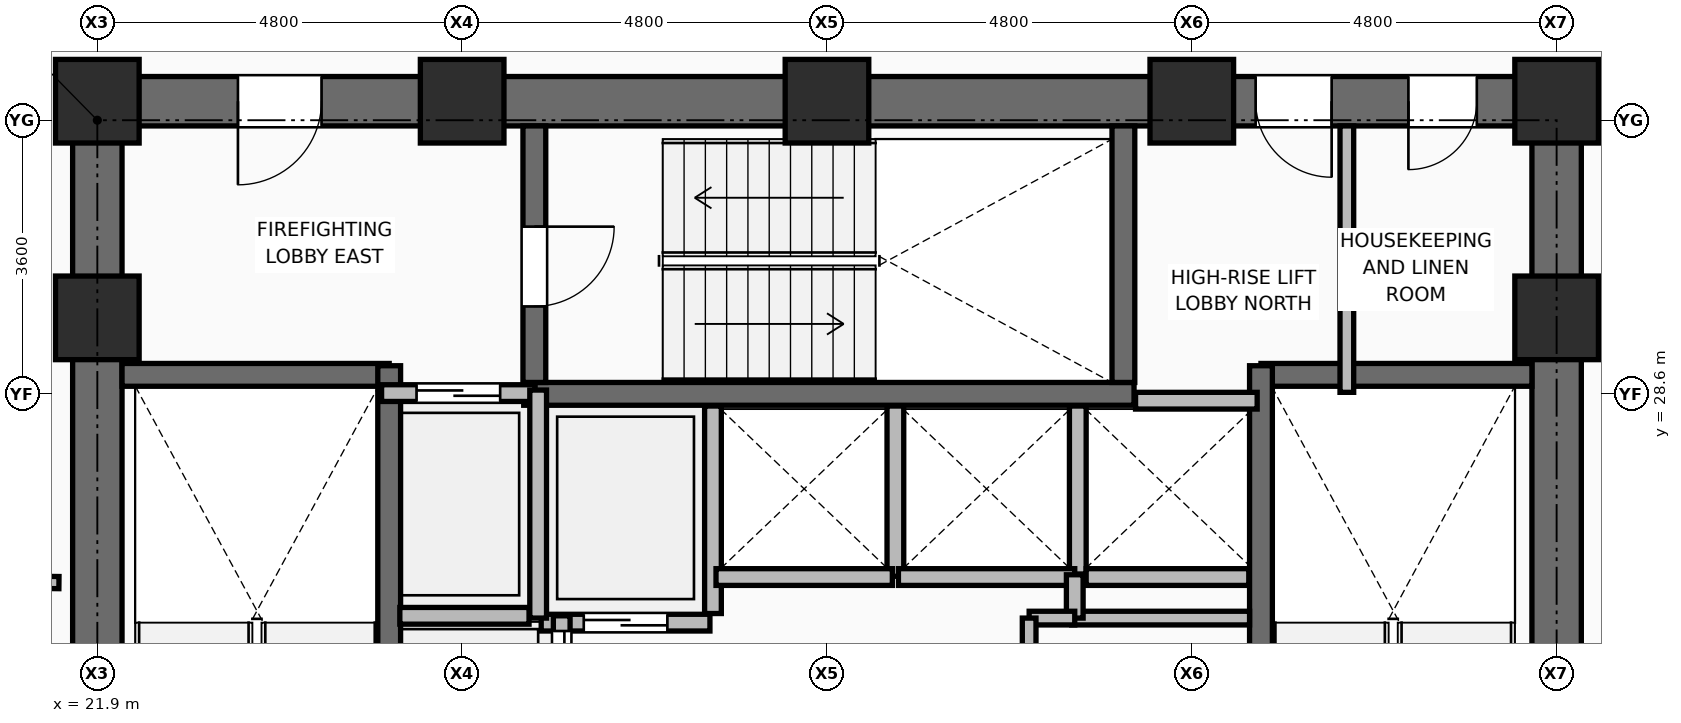
"""IFC4 building model, lengths in metres.
Left out: names, types, materials, properties, quantities, classifications, styles, units other than length and angle.
Written with IfcOpenShell. Run it as: python <this file> out.ifc"""

import sys

from ifc_helpers import new_model, si_unit, direction, frame, frame_2d, origin, origin_2d, place, context, subcontext, project, spatial, rectangle, extrude, element, fill, save


model = new_model("IFC4")
c1 = context("Model", 3, precision=1e-05, world=origin(), true_north=direction((0.0, 1.0)))
c2 = subcontext(c1, "Body", "Model", "MODEL_VIEW")
j1 = project(units=[si_unit("LENGTHUNIT", "METRE"), si_unit("PLANEANGLEUNIT", "RADIAN")], contexts=[c1])
p1 = place(None, origin())
s1 = spatial("IfcSite", under=j1, at=p1, CompositionType="ELEMENT")
p2 = place(p1, origin())
s2 = spatial("IfcBuilding", under=s1, at=p2, CompositionType="ELEMENT")
p3 = place(p2, frame((0.0, 0.0, 75.75)))
s3 = spatial("IfcBuildingStorey", under=s2, at=p3, CompositionType="ELEMENT", Elevation=75.75)
for number, where, z_axis, x_axis in (
    (1, (21.9, 29.6, 0.0), (0.0, 0.0, 1.0), (1.0, 0.0, 0.0)),
    (2, (41.1, 29.6, 0.0), (0.0, 0.0, 1.0), (1.0, 0.0, 0.0)),
    (3, (21.9, 32.45, 0.0), (0.0, 0.0, 1.0), (1.0, 0.0, 0.0)),
    (4, (26.7, 32.45, 0.0), (0.0, 0.0, 1.0), (1.0, 0.0, 0.0)),
    (5, (31.5, 32.45, 0.0), (0.0, 0.0, 1.0), (1.0, 0.0, 0.0)),
    (6, (36.3, 32.45, 0.0), (0.0, 0.0, 1.0), (1.0, 0.0, 0.0)),
    (7, (41.1, 32.45, 0.0), (0.0, 0.0, 1.0), (1.0, 0.0, 0.0)),
):
    element("IfcColumn", number, at=place(p3, frame(where, z_axis=z_axis, x_axis=x_axis)), inside=s3, PredefinedType="COLUMN", context=c2, shape_type="SweptSolid", body=[
        extrude(rectangle(XDim=1.1, YDim=1.1, at=origin_2d()), origin(), (0.0, 0.0, 1.0), 3.75),
    ])
p4 = place(p3, frame((30.0, 25.71, 0.0), z_axis=(0.0, 0.0, 1.0), x_axis=(0.0, 1.0, 0.0)))
e8 = element("IfcWall", 8, at=p4, inside=s3, PredefinedType="PARTITIONING", context=c2, shape_type="SweptSolid", body=[
    extrude(rectangle(XDim=2.73, YDim=0.22, at=frame_2d((1.365, 0.0))), origin(), (0.0, 0.0, 1.0), 3.545),
])
p5 = place(p3, frame((32.4, 26.2, 0.0), z_axis=(0.0, 0.0, 1.0), x_axis=(0.0, 1.0, 0.0)))
e9 = element("IfcWall", 9, at=p5, inside=s3, PredefinedType="PARTITIONING", context=c2, shape_type="SweptSolid", body=[
    extrude(rectangle(XDim=2.24, YDim=0.22, at=frame_2d((1.12, 0.0))), origin(), (0.0, 0.0, 1.0), 3.545),
])
p6 = place(p3, frame((34.8, 26.23, 0.0), z_axis=(0.0, 0.0, 1.0), x_axis=(0.0, 1.0, 0.0)))
e10 = element("IfcWall", 10, at=p6, inside=s3, PredefinedType="PARTITIONING", context=c2, shape_type="SweptSolid", body=[
    extrude(rectangle(XDim=2.21, YDim=0.22, at=frame_2d((1.105, 0.0))), origin(), (0.0, 0.0, 1.0), 3.545),
])
p7 = place(p3, frame((34.91, 26.19, 0.0), z_axis=(0.0, 0.0, 1.0), x_axis=(1.0, 0.0, 0.0)))
e11 = element("IfcWall", 11, at=p7, inside=s3, PredefinedType="PARTITIONING", context=c2, shape_type="SweptSolid", body=[
    extrude(rectangle(XDim=2.14, YDim=0.22, at=frame_2d((1.07, 0.0))), origin(), (0.0, 0.0, 1.0), 3.545),
])
p8 = place(p3, frame((21.575, 32.45, 0.0), z_axis=(0.0, 0.0, 1.0), x_axis=(1.0, 0.0, 0.0)))
e12 = element("IfcWall", 12, at=p8, inside=s3, PredefinedType="SHEAR", context=c2, shape_type="SweptSolid", body=[
    extrude(rectangle(XDim=19.85, YDim=0.65, at=frame_2d((9.925, 0.0))), origin(), (0.0, 0.0, 1.0), 3.57),
])
p9 = place(p8, frame((2.175, 0.0, 0.0)))
e13 = element("IfcOpeningElement", 13, at=p9, cuts=e12, PredefinedType="OPENING", context=c2, shape_type="SweptSolid", body=[
    extrude(rectangle(XDim=1.1, YDim=2.1, at=frame_2d((0.55, 1.05))), frame((0.0, 0.335, 0.0), z_axis=(0.0, -1.0, 0.0), x_axis=(1.0, 0.0, 0.0)), (0.0, 0.0, 1.0), 0.67),
])
p10 = place(p8, frame((15.565, 0.0, 0.0)))
e14 = element("IfcOpeningElement", 14, at=p10, cuts=e12, PredefinedType="OPENING", context=c2, shape_type="SweptSolid", body=[
    extrude(rectangle(XDim=1.0, YDim=2.1, at=frame_2d((0.5, 1.05))), frame((0.0, 0.335, 0.0), z_axis=(0.0, -1.0, 0.0), x_axis=(1.0, 0.0, 0.0)), (0.0, 0.0, 1.0), 0.67),
])
p11 = place(p8, frame((17.575, 0.0, 0.0)))
e15 = element("IfcOpeningElement", 15, at=p11, cuts=e12, PredefinedType="OPENING", context=c2, shape_type="SweptSolid", body=[
    extrude(rectangle(XDim=0.9, YDim=2.1, at=frame_2d((0.45, 1.05))), frame((0.0, 0.335, 0.0), z_axis=(0.0, -1.0, 0.0), x_axis=(1.0, 0.0, 0.0)), (0.0, 0.0, 1.0), 0.67),
])
p12 = place(p3, frame((21.9, 18.125, 0.0), z_axis=(0.0, 0.0, 1.0), x_axis=(0.0, 1.0, 0.0)))
e16 = element("IfcWall", 16, at=p12, inside=s3, PredefinedType="SHEAR", context=c2, shape_type="SweptSolid", body=[
    extrude(rectangle(XDim=14.0, YDim=0.65, at=frame_2d((7.0, 0.0))), origin(), (0.0, 0.0, 1.0), 3.57),
])
p13 = place(p3, frame((41.1, 18.125, 0.0), z_axis=(0.0, 0.0, 1.0), x_axis=(0.0, 1.0, 0.0)))
e17 = element("IfcWall", 17, at=p13, inside=s3, PredefinedType="SHEAR", context=c2, shape_type="SweptSolid", body=[
    extrude(rectangle(XDim=14.0, YDim=0.65, at=frame_2d((7.0, 0.0))), origin(), (0.0, 0.0, 1.0), 3.57),
])
p14 = place(p13, frame((3.335, 0.0, 0.0)))
e18 = element("IfcOpeningElement", 18, at=p14, cuts=e17, PredefinedType="OPENING", context=c2, shape_type="SweptSolid", body=[
    extrude(rectangle(XDim=1.05, YDim=2.1, at=frame_2d((0.525, 1.05))), frame((0.0, 0.335, 0.0), z_axis=(0.0, -1.0, 0.0), x_axis=(1.0, 0.0, 0.0)), (0.0, 0.0, 1.0), 0.67),
])
p15 = place(p3, frame((22.225, 28.85, 0.0), z_axis=(0.0, 0.0, 1.0), x_axis=(1.0, 0.0, 0.0)))
e19 = element("IfcWall", 19, at=p15, inside=s3, PredefinedType="SHEAR", context=c2, shape_type="SweptSolid", body=[
    extrude(rectangle(XDim=3.515, YDim=0.3, at=frame_2d((1.757, 0.0))), origin(), (0.0, 0.0, 1.0), 3.57),
])
p16 = place(p3, frame((25.74, 20.98, 0.0), z_axis=(0.0, 0.0, 1.0), x_axis=(0.0, 1.0, 0.0)))
e20 = element("IfcWall", 20, at=p16, inside=s3, PredefinedType="SHEAR", context=c2, shape_type="SweptSolid", body=[
    extrude(rectangle(XDim=7.99, YDim=0.3, at=frame_2d((3.995, 0.0))), origin(), (0.0, 0.0, 1.0), 3.57),
])
p17 = place(p3, frame((37.21, 28.85, 0.0), z_axis=(0.0, 0.0, 1.0), x_axis=(1.0, 0.0, 0.0)))
e21 = element("IfcWall", 21, at=p17, inside=s3, PredefinedType="SHEAR", context=c2, shape_type="SweptSolid", body=[
    extrude(rectangle(XDim=3.565, YDim=0.3, at=frame_2d((1.782, 0.0))), origin(), (0.0, 0.0, 1.0), 3.57),
])
p18 = place(p3, frame((37.21, 20.98, 0.0), z_axis=(0.0, 0.0, 1.0), x_axis=(0.0, 1.0, 0.0)))
e22 = element("IfcWall", 22, at=p18, inside=s3, PredefinedType="SHEAR", context=c2, shape_type="SweptSolid", body=[
    extrude(rectangle(XDim=7.99, YDim=0.3, at=frame_2d((3.995, 0.0))), origin(), (0.0, 0.0, 1.0), 3.57),
])
p19 = place(p3, frame((27.51, 28.6, 0.0), z_axis=(0.0, 0.0, 1.0), x_axis=(1.0, 0.0, 0.0)))
e23 = element("IfcWall", 23, at=p19, inside=s3, PredefinedType="SHEAR", context=c2, shape_type="SweptSolid", body=[
    extrude(rectangle(XDim=8.03, YDim=0.3, at=frame_2d((4.015, 0.0))), origin(), (0.0, 0.0, 1.0), 3.57),
])
p20 = place(p3, frame((27.65, 28.75, 0.0), z_axis=(0.0, 0.0, 1.0), x_axis=(0.0, 1.0, 0.0)))
e24 = element("IfcWall", 24, at=p20, inside=s3, PredefinedType="SHEAR", context=c2, shape_type="SweptSolid", body=[
    extrude(rectangle(XDim=3.375, YDim=0.3, at=frame_2d((1.688, 0.0))), origin(), (0.0, 0.0, 1.0), 3.57),
])
p21 = place(p20, frame((1.0, 0.0, 0.0)))
e25 = element("IfcOpeningElement", 25, at=p21, cuts=e24, PredefinedType="OPENING", context=c2, shape_type="SweptSolid", body=[
    extrude(rectangle(XDim=1.05, YDim=2.1, at=frame_2d((0.525, 1.05))), frame((0.0, 0.16, 0.0), z_axis=(0.0, -1.0, 0.0), x_axis=(1.0, 0.0, 0.0)), (0.0, 0.0, 1.0), 0.32),
])
p22 = place(p3, frame((35.4, 28.75, 0.0), z_axis=(0.0, 0.0, 1.0), x_axis=(0.0, 1.0, 0.0)))
e26 = element("IfcWall", 26, at=p22, inside=s3, PredefinedType="SHEAR", context=c2, shape_type="SweptSolid", body=[
    extrude(rectangle(XDim=3.375, YDim=0.3, at=frame_2d((1.688, 0.0))), origin(), (0.0, 0.0, 1.0), 3.57),
])
p23 = place(p3, frame((25.64, 28.61, 0.0), z_axis=(0.0, 0.0, 1.0), x_axis=(1.0, 0.0, 0.0)))
e27 = element("IfcWall", 27, at=p23, inside=s3, PredefinedType="PARTITIONING", context=c2, shape_type="SweptSolid", body=[
    extrude(rectangle(XDim=2.02, YDim=0.22, at=frame_2d((1.01, 0.0))), origin(), (0.0, 0.0, 1.0), 3.55),
])
p24 = place(p23, frame((0.46, 0.0, 0.0)))
e28 = element("IfcOpeningElement", 28, at=p24, cuts=e27, PredefinedType="OPENING", context=c2, shape_type="SweptSolid", body=[
    extrude(rectangle(XDim=1.1, YDim=2.2, at=frame_2d((0.55, 1.1))), frame((0.0, 0.12, 0.0), z_axis=(0.0, -1.0, 0.0), x_axis=(1.0, 0.0, 0.0)), (0.0, 0.0, 1.0), 0.24),
])
p25 = place(p3, frame((27.74, 25.59, 0.0), z_axis=(0.0, 0.0, 1.0), x_axis=(1.0, 0.0, 0.0)))
e29 = element("IfcWall", 29, at=p25, inside=s3, PredefinedType="PARTITIONING", context=c2, shape_type="SweptSolid", body=[
    extrude(rectangle(XDim=2.22, YDim=0.22, at=frame_2d((1.11, 0.0))), origin(), (0.0, 0.0, 1.0), 3.55),
])
p26 = place(p25, frame((0.56, 0.0, 0.0)))
e30 = element("IfcOpeningElement", 30, at=p26, cuts=e29, PredefinedType="OPENING", context=c2, shape_type="SweptSolid", body=[
    extrude(rectangle(XDim=1.1, YDim=2.2, at=frame_2d((0.55, 1.1))), frame((0.0, 0.12, 0.0), z_axis=(0.0, -1.0, 0.0), x_axis=(1.0, 0.0, 0.0)), (0.0, 0.0, 1.0), 0.24),
])
for number, where, z_axis, x_axis in (
    (31, (30.04, 26.19, 0.0), (0.0, 0.0, 1.0), (1.0, 0.0, 0.0)),
    (32, (32.44, 26.19, 0.0), (0.0, 0.0, 1.0), (1.0, 0.0, 0.0)),
):
    element("IfcWall", number, at=place(p3, frame(where, z_axis=z_axis, x_axis=x_axis)), inside=s3, PredefinedType="PARTITIONING", context=c2, shape_type="SweptSolid", body=[
        extrude(rectangle(XDim=2.32, YDim=0.22, at=frame_2d((1.16, 0.0))), origin(), (0.0, 0.0, 1.0), 3.55),
    ])
p27 = place(p3, frame((35.56, 28.51, 0.0), z_axis=(0.0, 0.0, 1.0), x_axis=(1.0, 0.0, 0.0)))
e33 = element("IfcWall", 33, at=p27, inside=s3, PredefinedType="PARTITIONING", context=c2, shape_type="SweptSolid", body=[
    extrude(rectangle(XDim=1.6, YDim=0.22, at=frame_2d((0.8, 0.0))), origin(), (0.0, 0.0, 1.0), 3.55),
])
p28 = place(p3, frame((28.01, 24.18, 0.0), z_axis=(0.0, 0.0, 1.0), x_axis=(0.0, 1.0, 0.0)))
e34 = element("IfcWall", 34, at=p28, inside=s3, PredefinedType="PARTITIONING", context=c2, shape_type="SweptSolid", body=[
    extrude(rectangle(XDim=1.5, YDim=0.22, at=frame_2d((0.75, 0.0))), origin(), (0.0, 0.0, 1.0), 3.55),
])
p29 = place(p28, frame((0.2, 0.0, 0.0)))
e35 = element("IfcOpeningElement", 35, at=p29, cuts=e34, PredefinedType="OPENING", context=c2, shape_type="SweptSolid", body=[
    extrude(rectangle(XDim=1.1, YDim=2.2, at=frame_2d((0.55, 1.1))), frame((0.0, 0.12, 0.0), z_axis=(0.0, -1.0, 0.0), x_axis=(1.0, 0.0, 0.0)), (0.0, 0.0, 1.0), 0.24),
])
p30 = place(p3, frame((27.7, 25.65, 0.0), z_axis=(0.0, 0.0, 1.0), x_axis=(0.0, 1.0, 0.0)))
e36 = element("IfcWall", 36, at=p30, inside=s3, PredefinedType="PARTITIONING", context=c2, shape_type="SweptSolid", body=[
    extrude(rectangle(XDim=3.0, YDim=0.22, at=frame_2d((1.5, 0.0))), origin(), (0.0, 0.0, 1.0), 3.55),
])
p31 = place(p3, frame((25.88, 25.68, 0.0), z_axis=(0.0, 0.0, 1.0), x_axis=(1.0, 0.0, 0.0)))
e37 = element("IfcWall", 37, at=p31, inside=s3, PredefinedType="PARTITIONING", context=c2, shape_type="SweptSolid", body=[
    extrude(rectangle(XDim=1.7, YDim=0.22, at=frame_2d((0.85, 0.0))), origin(), (0.0, 0.0, 1.0), 3.55),
])
p32 = place(p3, frame((34.72, 25.65, 0.0), z_axis=(0.0, 0.0, 1.0), x_axis=(1.0, 0.0, 0.0)))
e38 = element("IfcWall", 38, at=p32, inside=s3, PredefinedType="PARTITIONING", context=c2, shape_type="SweptSolid", body=[
    extrude(rectangle(XDim=2.34, YDim=0.18, at=frame_2d((1.17, 0.0))), origin(), (0.0, 0.0, 1.0), 3.55),
])
p33 = place(p3, frame((34.76, 25.65, 0.0), z_axis=(0.0, 0.0, 1.0), x_axis=(0.0, 1.0, 0.0)))
e39 = element("IfcWall", 39, at=p33, inside=s3, PredefinedType="PARTITIONING", context=c2, shape_type="SweptSolid", body=[
    extrude(rectangle(XDim=0.57, YDim=0.22, at=frame_2d((0.285, 0.0))), origin(), (0.0, 0.0, 1.0), 3.55),
])
p34 = place(p3, frame((34.16, 25.65, 0.0), z_axis=(0.0, 0.0, 1.0), x_axis=(1.0, 0.0, 0.0)))
e40 = element("IfcWall", 40, at=p34, inside=s3, PredefinedType="PARTITIONING", context=c2, shape_type="SweptSolid", body=[
    extrude(rectangle(XDim=0.6, YDim=0.18, at=frame_2d((0.3, 0.0))), origin(), (0.0, 0.0, 1.0), 3.55),
])
p35 = place(p3, frame((34.16, 21.1, 0.0), z_axis=(0.0, 0.0, 1.0), x_axis=(0.0, 1.0, 0.0)))
e41 = element("IfcWall", 41, at=p35, inside=s3, PredefinedType="PARTITIONING", context=c2, shape_type="SweptSolid", body=[
    extrude(rectangle(XDim=4.55, YDim=0.18, at=frame_2d((2.275, 0.0))), origin(), (0.0, 0.0, 1.0), 3.55),
])
p36 = place(p35, frame((1.825, 0.0, 0.0)))
e42 = element("IfcOpeningElement", 42, at=p36, cuts=e41, PredefinedType="OPENING", context=c2, shape_type="SweptSolid", body=[
    extrude(rectangle(XDim=0.9, YDim=2.1, at=frame_2d((0.45, 1.05))), frame((0.0, 0.1, 0.0), z_axis=(0.0, -1.0, 0.0), x_axis=(1.0, 0.0, 0.0)), (0.0, 0.0, 1.0), 0.2),
])
p37 = place(p3, frame((38.34, 28.62, 0.0), z_axis=(0.0, 0.0, 1.0), x_axis=(0.0, 1.0, 0.0)))
e43 = element("IfcWall", 43, at=p37, inside=s3, PredefinedType="PARTITIONING", context=c2, shape_type="SweptSolid", body=[
    extrude(rectangle(XDim=3.505, YDim=0.18, at=frame_2d((1.752, 0.0))), origin(), (0.0, 0.0, 1.0), 3.55),
])
p38 = place(p3, frame((21.395, 26.117, 0.0), z_axis=(0.0, 0.0, 1.0), x_axis=(-0.999934504226, 0.011444966545, 0.0)))
e44 = element("IfcWall", 44, at=p38, inside=s3, PredefinedType="PARTITIONING", context=c2, shape_type="SweptSolid", body=[
    extrude(rectangle(XDim=2.197, YDim=0.16, at=frame_2d((1.099, 0.0))), origin(), (0.0, 0.0, 1.0), 3.55),
])
p39 = place(p21, frame((1.05, 0.0, 0.0), z_axis=(0.0, 0.0, 1.0), x_axis=(-1.0, 0.0, 0.0)))
e45 = element("IfcDoor", 45, at=p39, inside=s3, OperationType="SINGLE_SWING_LEFT", PredefinedType="DOOR", context=c2, shape_type="SweptSolid", body=[
    extrude(rectangle(XDim=1.05, YDim=2.1, at=frame_2d((0.525, 1.05))), frame((0.0, 0.025, 0.0), z_axis=(0.0, -1.0, 0.0), x_axis=(1.0, 0.0, 0.0)), (0.0, 0.0, 1.0), 0.05),
])
fill(e25, e45)
p40 = place(p24, origin())
e46 = element("IfcDoor", 46, at=p40, inside=s3, OperationType="DOUBLE_DOOR_SLIDING", PredefinedType="DOOR", context=c2, shape_type="SweptSolid", body=[
    extrude(rectangle(XDim=1.1, YDim=2.2, at=frame_2d((0.55, 1.1))), frame((0.0, 0.025, 0.0), z_axis=(0.0, -1.0, 0.0), x_axis=(1.0, 0.0, 0.0)), (0.0, 0.0, 1.0), 0.05),
])
fill(e28, e46)
p41 = place(p26, frame((1.1, 0.0, 0.0), z_axis=(0.0, 0.0, 1.0), x_axis=(-1.0, 0.0, 0.0)))
e47 = element("IfcDoor", 47, at=p41, inside=s3, OperationType="DOUBLE_DOOR_SLIDING", PredefinedType="DOOR", context=c2, shape_type="SweptSolid", body=[
    extrude(rectangle(XDim=1.1, YDim=2.2, at=frame_2d((0.55, 1.1))), frame((0.0, 0.025, 0.0), z_axis=(0.0, -1.0, 0.0), x_axis=(1.0, 0.0, 0.0)), (0.0, 0.0, 1.0), 0.05),
])
fill(e30, e47)
p42 = place(p29, frame((1.1, 0.0, 0.0), z_axis=(0.0, 0.0, 1.0), x_axis=(-1.0, 0.0, 0.0)))
e48 = element("IfcDoor", 48, at=p42, inside=s3, OperationType="DOUBLE_DOOR_SLIDING", PredefinedType="DOOR", context=c2, shape_type="SweptSolid", body=[
    extrude(rectangle(XDim=1.1, YDim=2.2, at=frame_2d((0.55, 1.1))), frame((0.0, 0.025, 0.0), z_axis=(0.0, -1.0, 0.0), x_axis=(1.0, 0.0, 0.0)), (0.0, 0.0, 1.0), 0.05),
])
fill(e35, e48)
p43 = place(p9, frame((1.1, 0.0, 0.0), z_axis=(0.0, 0.0, 1.0), x_axis=(-1.0, 0.0, 0.0)))
e49 = element("IfcDoor", 49, at=p43, inside=s3, OperationType="SINGLE_SWING_RIGHT", PredefinedType="DOOR", context=c2, shape_type="SweptSolid", body=[
    extrude(rectangle(XDim=1.1, YDim=2.1, at=frame_2d((0.55, 1.05))), frame((0.0, 0.025, 0.0), z_axis=(0.0, -1.0, 0.0), x_axis=(1.0, 0.0, 0.0)), (0.0, 0.0, 1.0), 0.05),
])
fill(e13, e49)
p44 = place(p10, frame((1.0, 0.0, 0.0), z_axis=(0.0, 0.0, 1.0), x_axis=(-1.0, 0.0, 0.0)))
e50 = element("IfcDoor", 50, at=p44, inside=s3, OperationType="SINGLE_SWING_LEFT", PredefinedType="DOOR", context=c2, shape_type="SweptSolid", body=[
    extrude(rectangle(XDim=1.0, YDim=2.1, at=frame_2d((0.5, 1.05))), frame((0.0, 0.025, 0.0), z_axis=(0.0, -1.0, 0.0), x_axis=(1.0, 0.0, 0.0)), (0.0, 0.0, 1.0), 0.05),
])
fill(e14, e50)
p45 = place(p11, frame((0.9, 0.0, 0.0), z_axis=(0.0, 0.0, 1.0), x_axis=(-1.0, 0.0, 0.0)))
e51 = element("IfcDoor", 51, at=p45, inside=s3, OperationType="SINGLE_SWING_RIGHT", PredefinedType="DOOR", context=c2, shape_type="SweptSolid", body=[
    extrude(rectangle(XDim=0.9, YDim=2.1, at=frame_2d((0.45, 1.05))), frame((0.0, 0.025, 0.0), z_axis=(0.0, -1.0, 0.0), x_axis=(1.0, 0.0, 0.0)), (0.0, 0.0, 1.0), 0.05),
])
fill(e15, e51)
save(model, sys.argv[1])
